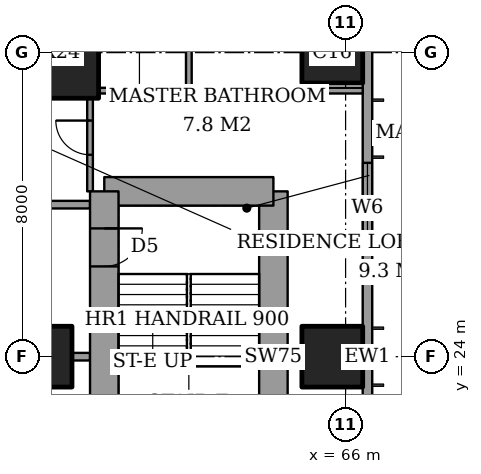
"""IFC4 building model, lengths in metres.
Left out: names, types, materials, properties, quantities, classifications, styles, units other than length and angle.
Written with IfcOpenShell. Run it as: python <this file> out.ifc"""

import sys

from ifc_helpers import new_model, si_unit, direction, frame, frame_2d, origin, origin_2d, place, context, subcontext, project, spatial, rectangle, extrude, element, fill, save


model = new_model("IFC4")
c1 = context("Model", 3, precision=1e-05, world=origin(), true_north=direction((0.0, 1.0)))
c2 = subcontext(c1, "Body", "Model", "MODEL_VIEW")
j1 = project(units=[si_unit("LENGTHUNIT", "METRE"), si_unit("PLANEANGLEUNIT", "RADIAN")], contexts=[c1])
p1 = place(None, origin())
s1 = spatial("IfcSite", under=j1, at=p1, CompositionType="ELEMENT")
p2 = place(p1, origin())
s2 = spatial("IfcBuilding", under=s1, at=p2, CompositionType="ELEMENT")
p3 = place(p2, frame((0.0, 0.0, 234.0)))
s3 = spatial("IfcBuildingStorey", under=s2, at=p3, CompositionType="ELEMENT", Elevation=234.0)
p4 = place(p3, frame((58.0, 24.0, 0.0), z_axis=(0.0, 0.0, 1.0), x_axis=(1.0, 0.0, 0.0)))
e1 = element("IfcColumn", 1, at=p4, inside=s3, PredefinedType="COLUMN", context=c2, shape_type="SweptSolid", body=[
    extrude(rectangle(XDim=1.6, YDim=1.6, at=origin_2d()), origin(), (0.0, 0.0, 1.0), 3.6),
])
p5 = place(p3, frame((58.0, 32.0, 0.0), z_axis=(0.0, 0.0, 1.0), x_axis=(1.0, 0.0, 0.0)))
e2 = element("IfcColumn", 2, at=p5, inside=s3, PredefinedType="COLUMN", context=c2, shape_type="SweptSolid", body=[
    extrude(rectangle(XDim=3.0, YDim=2.4, at=origin_2d()), origin(), (0.0, 0.0, 1.0), 3.6),
])
for number, where, z_axis, x_axis in (
    (3, (65.65, 24.0, 0.0), (0.0, 0.0, 1.0), (1.0, 0.0, 0.0)),
    (4, (65.65, 32.0, 0.0), (0.0, 0.0, 1.0), (1.0, 0.0, 0.0)),
):
    element("IfcColumn", number, at=place(p3, frame(where, z_axis=z_axis, x_axis=x_axis)), inside=s3, PredefinedType="COLUMN", context=c2, shape_type="SweptSolid", body=[
        extrude(rectangle(XDim=1.6, YDim=1.6, at=origin_2d()), origin(), (0.0, 0.0, 1.0), 3.6),
    ])
p6 = place(p3, frame((64.1, 19.65, 0.0), z_axis=(0.0, 0.0, 1.0), x_axis=(0.0, 1.0, 0.0)))
e5 = element("IfcWall", 5, at=p6, inside=s3, PredefinedType="SHEAR", context=c2, shape_type="SweptSolid", body=[
    extrude(rectangle(XDim=8.7, YDim=0.75, at=frame_2d((4.35, 0.0))), origin(), (0.0, 0.0, 1.0), 3.6),
])
p7 = place(p3, frame((64.1, 28.35, 0.0), z_axis=(0.0, 0.0, 1.0), x_axis=(-1.0, 0.0, 0.0)))
e6 = element("IfcWall", 6, at=p7, inside=s3, PredefinedType="SHEAR", context=c2, shape_type="SweptSolid", body=[
    extrude(rectangle(XDim=4.45, YDim=0.75, at=frame_2d((2.225, 0.0))), origin(), (0.0, 0.0, 1.0), 3.6),
])
p8 = place(p3, frame((59.65, 28.35, 0.0), z_axis=(0.0, 0.0, 1.0), x_axis=(0.0, -1.0, 0.0)))
e7 = element("IfcWall", 7, at=p8, inside=s3, PredefinedType="SHEAR", context=c2, shape_type="SweptSolid", body=[
    extrude(rectangle(XDim=8.7, YDim=0.75, at=frame_2d((4.35, 0.0))), origin(), (0.0, 0.0, 1.0), 3.6),
])
p9 = place(p8, frame((0.975, 0.0, 0.0)))
e8 = element("IfcOpeningElement", 8, at=p9, cuts=e7, PredefinedType="OPENING", context=c2, shape_type="SweptSolid", body=[
    extrude(rectangle(XDim=1.0, YDim=2.1, at=frame_2d((0.5, 1.05))), frame((0.0, 0.385, 0.0), z_axis=(0.0, -1.0, 0.0), x_axis=(1.0, 0.0, 0.0)), (0.0, 0.0, 1.0), 0.77),
])
p10 = place(p3, frame((66.575, 3.175, 0.0), z_axis=(0.0, 0.0, 1.0), x_axis=(0.0, 1.0, 0.0)))
e9 = element("IfcWall", 9, at=p10, inside=s3, PredefinedType="SOLIDWALL", context=c2, shape_type="SweptSolid", body=[
    extrude(rectangle(XDim=41.65, YDim=0.25, at=frame_2d((20.825, 0.0))), origin(), (0.0, 0.0, 1.0), 3.6),
])
p11 = place(p10, frame((0.875, 0.0, 0.6)))
e10 = element("IfcOpeningElement", 10, at=p11, cuts=e9, PredefinedType="OPENING", context=c2, shape_type="SweptSolid", body=[
    extrude(rectangle(XDim=2.4, YDim=2.0, at=frame_2d((1.2, 1.0))), frame((0.0, 0.135, 0.0), z_axis=(0.0, -1.0, 0.0), x_axis=(1.0, 0.0, 0.0)), (0.0, 0.0, 1.0), 0.27),
])
p12 = place(p10, frame((6.225, 0.0, 0.6)))
e11 = element("IfcOpeningElement", 11, at=p12, cuts=e9, PredefinedType="OPENING", context=c2, shape_type="SweptSolid", body=[
    extrude(rectangle(XDim=1.2, YDim=2.0, at=frame_2d((0.6, 1.0))), frame((0.0, 0.135, 0.0), z_axis=(0.0, -1.0, 0.0), x_axis=(1.0, 0.0, 0.0)), (0.0, 0.0, 1.0), 0.27),
])
p13 = place(p10, frame((8.725, 0.0, 0.6)))
e12 = element("IfcOpeningElement", 12, at=p13, cuts=e9, PredefinedType="OPENING", context=c2, shape_type="SweptSolid", body=[
    extrude(rectangle(XDim=2.4, YDim=2.0, at=frame_2d((1.2, 1.0))), frame((0.0, 0.135, 0.0), z_axis=(0.0, -1.0, 0.0), x_axis=(1.0, 0.0, 0.0)), (0.0, 0.0, 1.0), 0.27),
])
p14 = place(p10, frame((15.725, 0.0, 0.6)))
e13 = element("IfcOpeningElement", 13, at=p14, cuts=e9, PredefinedType="OPENING", context=c2, shape_type="SweptSolid", body=[
    extrude(rectangle(XDim=2.4, YDim=2.0, at=frame_2d((1.2, 1.0))), frame((0.0, 0.135, 0.0), z_axis=(0.0, -1.0, 0.0), x_axis=(1.0, 0.0, 0.0)), (0.0, 0.0, 1.0), 0.27),
])
p15 = place(p10, frame((23.525, 0.0, 0.6)))
e14 = element("IfcOpeningElement", 14, at=p15, cuts=e9, PredefinedType="OPENING", context=c2, shape_type="SweptSolid", body=[
    extrude(rectangle(XDim=2.4, YDim=2.0, at=frame_2d((1.2, 1.0))), frame((0.0, 0.135, 0.0), z_axis=(0.0, -1.0, 0.0), x_axis=(1.0, 0.0, 0.0)), (0.0, 0.0, 1.0), 0.27),
])
p16 = place(p10, frame((30.725, 0.0, 0.6)))
e15 = element("IfcOpeningElement", 15, at=p16, cuts=e9, PredefinedType="OPENING", context=c2, shape_type="SweptSolid", body=[
    extrude(rectangle(XDim=2.4, YDim=2.0, at=frame_2d((1.2, 1.0))), frame((0.0, 0.135, 0.0), z_axis=(0.0, -1.0, 0.0), x_axis=(1.0, 0.0, 0.0)), (0.0, 0.0, 1.0), 0.27),
])
p17 = place(p10, frame((34.525, 0.0, 0.6)))
e16 = element("IfcOpeningElement", 16, at=p17, cuts=e9, PredefinedType="OPENING", context=c2, shape_type="SweptSolid", body=[
    extrude(rectangle(XDim=1.2, YDim=2.0, at=frame_2d((0.6, 1.0))), frame((0.0, 0.135, 0.0), z_axis=(0.0, -1.0, 0.0), x_axis=(1.0, 0.0, 0.0)), (0.0, 0.0, 1.0), 0.27),
])
p18 = place(p10, frame((38.375, 0.0, 0.6)))
e17 = element("IfcOpeningElement", 17, at=p18, cuts=e9, PredefinedType="OPENING", context=c2, shape_type="SweptSolid", body=[
    extrude(rectangle(XDim=2.4, YDim=2.0, at=frame_2d((1.2, 1.0))), frame((0.0, 0.135, 0.0), z_axis=(0.0, -1.0, 0.0), x_axis=(1.0, 0.0, 0.0)), (0.0, 0.0, 1.0), 0.27),
])
p19 = place(p3, frame((58.8, 24.0, 0.0), z_axis=(0.0, 0.0, 1.0), x_axis=(1.0, 0.0, 0.0)))
e18 = element("IfcWall", 18, at=p19, inside=s3, PredefinedType="PARTITIONING", context=c2, shape_type="SweptSolid", body=[
    extrude(rectangle(XDim=0.475, YDim=0.2, at=frame_2d((0.237, 0.0))), origin(), (0.0, 0.0, 1.0), 3.35),
])
p20 = place(p3, frame((64.475, 24.0, 0.0), z_axis=(0.0, 0.0, 1.0), x_axis=(1.0, 0.0, 0.0)))
e19 = element("IfcWall", 19, at=p20, inside=s3, PredefinedType="PARTITIONING", context=c2, shape_type="SweptSolid", body=[
    extrude(rectangle(XDim=0.375, YDim=0.15, at=frame_2d((0.188, 0.0))), origin(), (0.0, 0.0, 1.0), 3.35),
])
p21 = place(p3, frame((42.0, 28.0, 0.0), z_axis=(0.0, 0.0, 1.0), x_axis=(1.0, 0.0, 0.0)))
e20 = element("IfcWall", 20, at=p21, inside=s3, PredefinedType="PARTITIONING", context=c2, shape_type="SweptSolid", body=[
    extrude(rectangle(XDim=17.275, YDim=0.2, at=frame_2d((8.637, 0.0))), origin(), (0.0, 0.0, 1.0), 3.35),
])
p22 = place(p21, frame((9.4, 0.0, 0.0)))
e21 = element("IfcOpeningElement", 21, at=p22, cuts=e20, PredefinedType="OPENING", context=c2, shape_type="SweptSolid", body=[
    extrude(rectangle(XDim=1.2, YDim=2.4, at=frame_2d((0.6, 1.2))), frame((0.0, 0.11, 0.0), z_axis=(0.0, -1.0, 0.0), x_axis=(1.0, 0.0, 0.0)), (0.0, 0.0, 1.0), 0.22),
])
p23 = place(p3, frame((59.5, 31.0, 0.0), z_axis=(0.0, 0.0, 1.0), x_axis=(1.0, 0.0, 0.0)))
e22 = element("IfcWall", 22, at=p23, inside=s3, PredefinedType="PARTITIONING", context=c2, shape_type="SweptSolid", body=[
    extrude(rectangle(XDim=6.95, YDim=0.15, at=frame_2d((3.475, 0.0))), origin(), (0.0, 0.0, 1.0), 3.35),
])
p24 = place(p3, frame((59.275, 28.35, 0.0), z_axis=(0.0, 0.0, 1.0), x_axis=(0.0, 1.0, 0.0)))
e23 = element("IfcWall", 23, at=p24, inside=s3, PredefinedType="PARTITIONING", context=c2, shape_type="SweptSolid", body=[
    extrude(rectangle(XDim=2.45, YDim=0.15, at=frame_2d((1.225, 0.0))), origin(), (0.0, 0.0, 1.0), 3.35),
])
p25 = place(p24, frame((0.962, 0.0, 0.0)))
e24 = element("IfcOpeningElement", 24, at=p25, cuts=e23, PredefinedType="OPENING", context=c2, shape_type="SweptSolid", body=[
    extrude(rectangle(XDim=0.9, YDim=2.1, at=frame_2d((0.45, 1.05))), frame((0.0, 0.085, 0.0), z_axis=(0.0, -1.0, 0.0), x_axis=(1.0, 0.0, 0.0)), (0.0, 0.0, 1.0), 0.17),
])
p26 = place(p3, frame((61.875, 31.0, 0.0), z_axis=(0.0, 0.0, 1.0), x_axis=(0.0, 1.0, 0.0)))
e25 = element("IfcWall", 25, at=p26, inside=s3, PredefinedType="PARTITIONING", context=c2, shape_type="SweptSolid", body=[
    extrude(rectangle(XDim=3.0, YDim=0.15, at=frame_2d((1.5, 0.0))), origin(), (0.0, 0.0, 1.0), 3.35),
])
p27 = place(p26, frame((1.05, 0.0, 0.0)))
e26 = element("IfcOpeningElement", 26, at=p27, cuts=e25, PredefinedType="OPENING", context=c2, shape_type="SweptSolid", body=[
    extrude(rectangle(XDim=0.9, YDim=2.1, at=frame_2d((0.45, 1.05))), frame((0.0, 0.085, 0.0), z_axis=(0.0, -1.0, 0.0), x_axis=(1.0, 0.0, 0.0)), (0.0, 0.0, 1.0), 0.17),
])
p28 = place(p15, origin())
e27 = element("IfcWindow", 27, at=p28, inside=s3, PartitioningType="SINGLE_PANEL", PredefinedType="WINDOW", context=c2, shape_type="SweptSolid", body=[
    extrude(rectangle(XDim=2.4, YDim=2.0, at=frame_2d((1.2, 1.0))), frame((0.0, 0.03, 0.0), z_axis=(0.0, -1.0, 0.0), x_axis=(1.0, 0.0, 0.0)), (0.0, 0.0, 1.0), 0.06),
])
fill(e14, e27)
p29 = place(p25, origin())
e28 = element("IfcDoor", 28, at=p29, inside=s3, OperationType="SINGLE_SWING_LEFT", PredefinedType="DOOR", context=c2, shape_type="SweptSolid", body=[
    extrude(rectangle(XDim=0.9, YDim=2.1, at=frame_2d((0.45, 1.05))), frame((0.0, 0.025, 0.0), z_axis=(0.0, -1.0, 0.0), x_axis=(1.0, 0.0, 0.0)), (0.0, 0.0, 1.0), 0.05),
])
fill(e24, e28)
p30 = place(p9, origin())
e29 = element("IfcDoor", 29, at=p30, inside=s3, OperationType="SINGLE_SWING_RIGHT", PredefinedType="DOOR", context=c2, shape_type="SweptSolid", body=[
    extrude(rectangle(XDim=1.0, YDim=2.1, at=frame_2d((0.5, 1.05))), frame((0.0, 0.025, 0.0), z_axis=(0.0, -1.0, 0.0), x_axis=(1.0, 0.0, 0.0)), (0.0, 0.0, 1.0), 0.05),
])
fill(e8, e29)
save(model, sys.argv[1])
